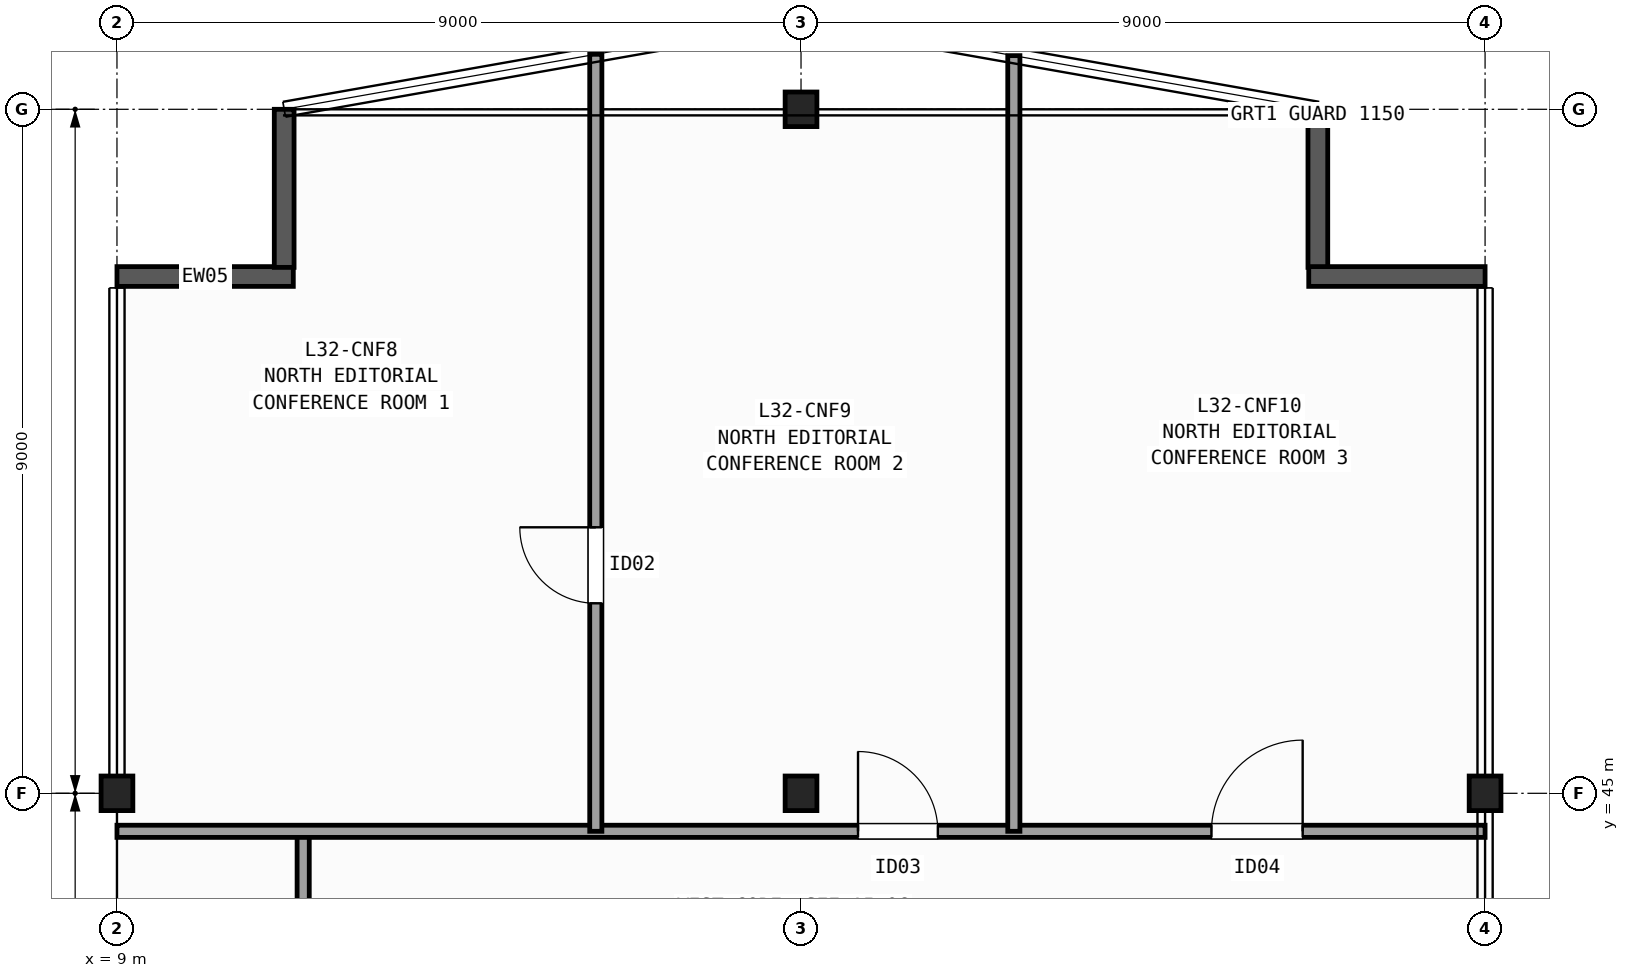
"""IFC4 building model, lengths in metres.
Left out: names, types, materials, properties, quantities, classifications, styles, units other than length and angle.
Written with IfcOpenShell. Run it as: python <this file> out.ifc"""

import sys

from ifc_helpers import new_model, si_unit, direction, frame, frame_2d, origin, origin_2d, place, context, subcontext, project, spatial, rectangle, i_section, extrude, element, fill, save


model = new_model("IFC4")
c1 = context("Model", 3, precision=1e-05, world=origin(), true_north=direction((0.0, 1.0)))
c2 = subcontext(c1, "Body", "Model", "MODEL_VIEW")
j1 = project(units=[si_unit("LENGTHUNIT", "METRE"), si_unit("PLANEANGLEUNIT", "RADIAN")], contexts=[c1])
p1 = place(None, origin())
s1 = spatial("IfcSite", under=j1, at=p1, CompositionType="ELEMENT")
p2 = place(p1, origin())
s2 = spatial("IfcBuilding", under=s1, at=p2, CompositionType="ELEMENT")
p3 = place(p2, frame((0.0, 0.0, 132.2)))
s3 = spatial("IfcBuildingStorey", under=s2, at=p3, CompositionType="ELEMENT", Elevation=132.2)
for number, where, z_axis, x_axis in (
    (1, (9.0, 45.0, 0.0), (0.0, 0.0, 1.0), (1.0, 0.0, 0.0)),
    (2, (18.0, 45.0, 0.0), (0.0, 0.0, 1.0), (1.0, 0.0, 0.0)),
    (3, (18.0, 54.0, 0.0), (0.0, 0.0, 1.0), (1.0, 0.0, 0.0)),
    (4, (27.0, 45.0, 0.0), (0.0, 0.0, 1.0), (1.0, 0.0, 0.0)),
):
    element("IfcColumn", number, at=place(p3, frame(where, z_axis=z_axis, x_axis=x_axis)), inside=s3, PredefinedType="COLUMN", context=c2, shape_type="SweptSolid", body=[
        extrude(i_section(OverallWidth=0.418, OverallDepth=0.455, WebThickness=0.042, FlangeThickness=0.068, FilletRadius=0.015, at=origin_2d()), origin(), (0.0, 0.0, 1.0), 3.7),
    ])
p4 = place(p3, frame((9.0, 51.8, 0.0), z_axis=(0.0, 0.0, 1.0), x_axis=(1.0, 0.0, 0.0)))
e5 = element("IfcWall", 5, at=p4, inside=s3, PredefinedType="SOLIDWALL", context=c2, shape_type="SweptSolid", body=[
    extrude(rectangle(XDim=2.32, YDim=0.26, at=frame_2d((1.16, 0.0))), origin(), (0.0, 0.0, 1.0), 3.42),
])
for number, where, z_axis, x_axis in (
    (6, (11.2, 51.92, 0.0), (0.0, 0.0, 1.0), (0.0, 1.0, 0.0)),
    (7, (24.8, 54.0, 0.0), (0.0, 0.0, 1.0), (0.0, -1.0, 0.0)),
):
    element("IfcWall", number, at=place(p3, frame(where, z_axis=z_axis, x_axis=x_axis)), inside=s3, PredefinedType="SOLIDWALL", context=c2, shape_type="SweptSolid", body=[
        extrude(rectangle(XDim=2.08, YDim=0.26, at=frame_2d((1.04, 0.0))), origin(), (0.0, 0.0, 1.0), 3.42),
    ])
p5 = place(p3, frame((24.68, 51.8, 0.0), z_axis=(0.0, 0.0, 1.0), x_axis=(1.0, 0.0, 0.0)))
e8 = element("IfcWall", 8, at=p5, inside=s3, PredefinedType="SOLIDWALL", context=c2, shape_type="SweptSolid", body=[
    extrude(rectangle(XDim=2.32, YDim=0.26, at=frame_2d((1.16, 0.0))), origin(), (0.0, 0.0, 1.0), 3.42),
])
p6 = place(p3, frame((11.45, 42.4, 0.0), z_axis=(0.0, 0.0, 1.0), x_axis=(0.0, 1.0, 0.0)))
e9 = element("IfcWall", 9, at=p6, inside=s3, PredefinedType="PARTITIONING", context=c2, shape_type="SweptSolid", body=[
    extrude(rectangle(XDim=2.1, YDim=0.16, at=frame_2d((1.05, 0.0))), origin(), (0.0, 0.0, 1.0), 3.42),
])
p7 = place(p3, frame((9.0, 44.5, 0.0), z_axis=(0.0, 0.0, 1.0), x_axis=(1.0, 0.0, 0.0)))
e10 = element("IfcWall", 10, at=p7, inside=s3, PredefinedType="PARTITIONING", context=c2, shape_type="SweptSolid", body=[
    extrude(rectangle(XDim=18.0, YDim=0.16, at=frame_2d((9.0, 0.0))), origin(), (0.0, 0.0, 1.0), 2.634),
])
p8 = place(p7, frame((9.75, 0.0, 0.0)))
e11 = element("IfcOpeningElement", 11, at=p8, cuts=e10, PredefinedType="OPENING", context=c2, shape_type="SweptSolid", body=[
    extrude(rectangle(XDim=1.05, YDim=2.15, at=frame_2d((0.525, 1.075))), frame((0.0, 0.09, 0.0), z_axis=(0.0, -1.0, 0.0), x_axis=(1.0, 0.0, 0.0)), (0.0, 0.0, 1.0), 0.18),
])
p9 = place(p7, frame((14.4, 0.0, 0.0)))
e12 = element("IfcOpeningElement", 12, at=p9, cuts=e10, PredefinedType="OPENING", context=c2, shape_type="SweptSolid", body=[
    extrude(rectangle(XDim=1.2, YDim=2.15, at=frame_2d((0.6, 1.075))), frame((0.0, 0.09, 0.0), z_axis=(0.0, -1.0, 0.0), x_axis=(1.0, 0.0, 0.0)), (0.0, 0.0, 1.0), 0.18),
])
p10 = place(p3, frame((15.3, 44.5, 0.0), z_axis=(0.0, 0.0, 1.0), x_axis=(0.0, 1.0, 0.0)))
e13 = element("IfcWall", 13, at=p10, inside=s3, PredefinedType="PARTITIONING", context=c2, shape_type="SweptSolid", body=[
    extrude(rectangle(XDim=10.224, YDim=0.16, at=frame_2d((5.112, 0.0))), origin(), (0.0, 0.0, 1.0), 3.42),
])
p11 = place(p10, frame((3.0, 0.0, 0.0)))
e14 = element("IfcOpeningElement", 14, at=p11, cuts=e13, PredefinedType="OPENING", context=c2, shape_type="SweptSolid", body=[
    extrude(rectangle(XDim=1.0, YDim=2.1, at=frame_2d((0.5, 1.05))), frame((0.0, 0.09, 0.0), z_axis=(0.0, -1.0, 0.0), x_axis=(1.0, 0.0, 0.0)), (0.0, 0.0, 1.0), 0.18),
])
p12 = place(p3, frame((20.8, 44.5, 0.0), z_axis=(0.0, 0.0, 1.0), x_axis=(0.0, 1.0, 0.0)))
e15 = element("IfcWall", 15, at=p12, inside=s3, PredefinedType="PARTITIONING", context=c2, shape_type="SweptSolid", body=[
    extrude(rectangle(XDim=10.206, YDim=0.16, at=frame_2d((5.103, 0.0))), origin(), (0.0, 0.0, 1.0), 3.42),
])
p13 = place(p11, origin())
e16 = element("IfcDoor", 16, at=p13, inside=s3, OperationType="SINGLE_SWING_RIGHT", PredefinedType="DOOR", context=c2, shape_type="SweptSolid", body=[
    extrude(rectangle(XDim=1.0, YDim=2.1, at=frame_2d((0.5, 1.05))), frame((0.0, 0.025, 0.0), z_axis=(0.0, -1.0, 0.0), x_axis=(1.0, 0.0, 0.0)), (0.0, 0.0, 1.0), 0.05),
])
fill(e14, e16)
p14 = place(p8, origin())
e17 = element("IfcDoor", 17, at=p14, inside=s3, OperationType="SINGLE_SWING_LEFT", PredefinedType="DOOR", context=c2, shape_type="SweptSolid", body=[
    extrude(rectangle(XDim=1.05, YDim=2.15, at=frame_2d((0.525, 1.075))), frame((0.0, 0.025, 0.0), z_axis=(0.0, -1.0, 0.0), x_axis=(1.0, 0.0, 0.0)), (0.0, 0.0, 1.0), 0.05),
])
fill(e11, e17)
p15 = place(p9, origin())
e18 = element("IfcDoor", 18, at=p15, inside=s3, OperationType="SINGLE_SWING_RIGHT", PredefinedType="DOOR", context=c2, shape_type="SweptSolid", body=[
    extrude(rectangle(XDim=1.2, YDim=2.15, at=frame_2d((0.6, 1.075))), frame((0.0, 0.025, 0.0), z_axis=(0.0, -1.0, 0.0), x_axis=(1.0, 0.0, 0.0)), (0.0, 0.0, 1.0), 0.05),
])
fill(e12, e18)
save(model, sys.argv[1])
